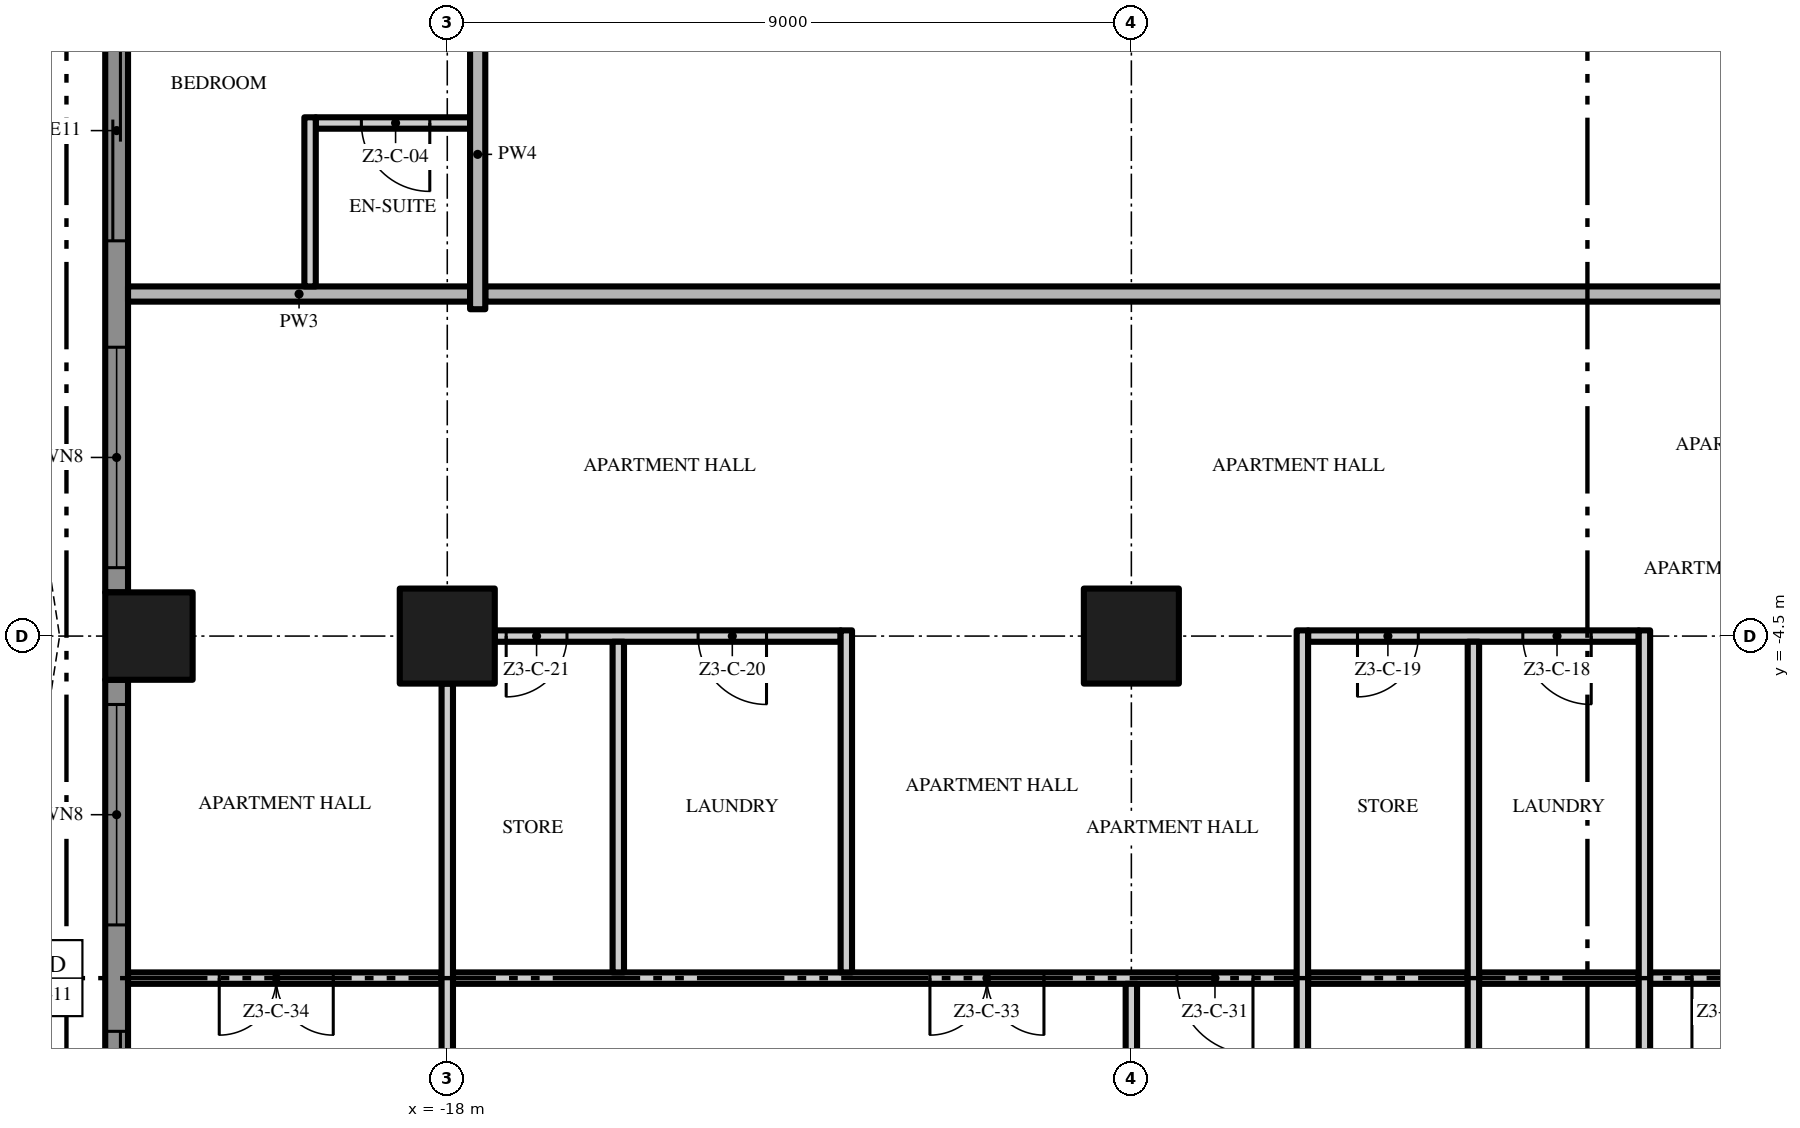
"""IFC4 building model, lengths in metres.
Left out: names, types, materials, properties, quantities, classifications, styles, units other than length and angle.
Written with IfcOpenShell. Run it as: python <this file> out.ifc"""

import sys

from ifc_helpers import new_model, si_unit, direction, frame, frame_2d, origin, origin_2d, place, context, subcontext, project, spatial, polyline, rectangle, outline, extrude, element, fill, save


model = new_model("IFC4")
c1 = context("Model", 3, precision=1e-05, world=origin(), true_north=direction((0.0, 1.0)))
c2 = subcontext(c1, "Body", "Model", "MODEL_VIEW")
j1 = project(units=[si_unit("LENGTHUNIT", "METRE"), si_unit("PLANEANGLEUNIT", "RADIAN")], contexts=[c1])
p1 = place(None, origin())
s1 = spatial("IfcSite", under=j1, at=p1, CompositionType="ELEMENT")
p2 = place(p1, origin())
s2 = spatial("IfcBuilding", under=s1, at=p2, CompositionType="ELEMENT")
p3 = place(p2, frame((0.0, 0.0, 151.6)))
s3 = spatial("IfcBuildingStorey", under=s2, at=p3, CompositionType="ELEMENT", Elevation=151.6)
p4 = place(p3, frame((-18.0, -4.5, 0.0), z_axis=(0.0, 0.0, 1.0), x_axis=(1.0, 0.0, 0.0)))
e1 = element("IfcColumn", 1, at=p4, inside=s3, PredefinedType="COLUMN", context=c2, shape_type="SweptSolid", body=[
    extrude(rectangle(XDim=1.25, YDim=1.25, at=origin_2d()), origin(), (0.0, 0.0, 1.0), 3.5),
])
p5 = place(p3, frame((-21.925, -4.5, 0.0), z_axis=(0.0, 0.0, 1.0), x_axis=(1.0, 0.0, 0.0)))
e2 = element("IfcColumn", 2, at=p5, inside=s3, PredefinedType="COLUMN", context=c2, shape_type="SweptSolid", body=[
    extrude(rectangle(XDim=1.15, YDim=1.15, at=origin_2d()), origin(), (0.0, 0.0, 1.0), 3.5),
])
p6 = place(p3, frame((-9.0, -4.5, 0.0), z_axis=(0.0, 0.0, 1.0), x_axis=(1.0, 0.0, 0.0)))
e3 = element("IfcColumn", 3, at=p6, inside=s3, PredefinedType="COLUMN", context=c2, shape_type="SweptSolid", body=[
    extrude(rectangle(XDim=1.25, YDim=1.25, at=origin_2d()), origin(), (0.0, 0.0, 1.0), 3.5),
])
p7 = place(p3, frame((-22.35, -3.925, 0.0), z_axis=(0.0, 0.0, 1.0), x_axis=(0.0, 1.0, 0.0)))
e4 = element("IfcWall", 4, at=p7, inside=s3, PredefinedType="SOLIDWALL", context=c2, shape_type="SweptSolid", body=[
    extrude(rectangle(XDim=7.85, YDim=0.3, at=frame_2d((3.925, 0.0))), origin(), (0.0, 0.0, 1.0), 3.5),
])
p8 = place(p7, frame((4.625, 0.0, 0.0)))
e5 = element("IfcOpeningElement", 5, at=p8, cuts=e4, PredefinedType="OPENING", context=c2, shape_type="SweptSolid", body=[
    extrude(rectangle(XDim=2.9, YDim=2.4, at=frame_2d((1.45, 1.2))), frame((0.0, 0.16, 0.0), z_axis=(0.0, -1.0, 0.0), x_axis=(1.0, 0.0, 0.0)), (0.0, 0.0, 1.0), 0.32),
])
p9 = place(p7, frame((0.325, 0.0, 0.45)))
e6 = element("IfcOpeningElement", 6, at=p9, cuts=e4, PredefinedType="OPENING", context=c2, shape_type="SweptSolid", body=[
    extrude(rectangle(XDim=2.9, YDim=2.65, at=frame_2d((1.45, 1.325))), frame((0.0, 0.16, 0.0), z_axis=(0.0, -1.0, 0.0), x_axis=(1.0, 0.0, 0.0)), (0.0, 0.0, 1.0), 0.32),
])
p10 = place(p3, frame((-22.35, -12.35, 0.0), z_axis=(0.0, 0.0, 1.0), x_axis=(0.0, 1.0, 0.0)))
e7 = element("IfcWall", 7, at=p10, inside=s3, PredefinedType="SOLIDWALL", context=c2, shape_type="SweptSolid", body=[
    extrude(rectangle(XDim=7.275, YDim=0.3, at=frame_2d((3.638, 0.0))), origin(), (0.0, 0.0, 1.0), 3.5),
])
p11 = place(p10, frame((4.05, 0.0, 0.45)))
e8 = element("IfcOpeningElement", 8, at=p11, cuts=e7, PredefinedType="OPENING", context=c2, shape_type="SweptSolid", body=[
    extrude(rectangle(XDim=2.9, YDim=2.65, at=frame_2d((1.45, 1.325))), frame((0.0, 0.16, 0.0), z_axis=(0.0, -1.0, 0.0), x_axis=(1.0, 0.0, 0.0)), (0.0, 0.0, 1.0), 0.32),
])
p12 = place(p10, frame((0.3, 0.0, 0.0)))
e9 = element("IfcOpeningElement", 9, at=p12, cuts=e7, PredefinedType="OPENING", context=c2, shape_type="SweptSolid", body=[
    extrude(rectangle(XDim=2.35, YDim=2.4, at=frame_2d((1.175, 1.2))), frame((0.0, 0.16, 0.0), z_axis=(0.0, -1.0, 0.0), x_axis=(1.0, 0.0, 0.0)), (0.0, 0.0, 1.0), 0.32),
])
p13 = place(p3, origin())
e10 = element("IfcWall", 10, at=p13, inside=s3, PredefinedType="USERDEFINED", context=c2, shape_type="SweptSolid", body=[
    extrude(outline(polyline([(-25.5, 18.0), (-25.271, 16.5), (-24.671, 15.0), (-23.929, 13.5), (-23.329, 12.0), (-23.1, 10.5), (-23.329, 9.0), (-23.929, 7.5), (-24.671, 6.0), (-25.271, 4.5), (-25.5, 3.0), (-25.271, 1.5), (-24.671, 0.0), (-23.929, -1.5), (-23.329, -3.0), (-23.1, -4.5), (-23.329, -6.0), (-23.929, -7.5), (-24.671, -9.0), (-25.271, -10.5), (-25.5, -12.0), (-25.271, -13.5), (-25.024, -13.462), (-25.247, -12.0), (-25.028, -10.566), (-24.442, -9.102), (-23.701, -7.602), (-23.086, -6.066), (-22.847, -4.5), (-23.086, -2.934), (-23.701, -1.398), (-24.442, 0.102), (-25.028, 1.566), (-25.247, 3.0), (-25.028, 4.434), (-24.442, 5.898), (-23.701, 7.398), (-23.086, 8.934), (-22.847, 10.5), (-23.086, 12.066), (-23.701, 13.602), (-24.442, 15.102), (-25.028, 16.566), (-25.253, 18.038), (-25.5, 18.0)])), origin(), (0.0, 0.0, 1.0), 0.9),
])
p14 = place(p3, frame((-18.075, -9.0, 0.0), z_axis=(0.0, 0.0, 1.0), x_axis=(-1.0, 0.0, 0.0)))
e11 = element("IfcWall", 11, at=p14, inside=s3, PredefinedType="PARTITIONING", context=c2, shape_type="SweptSolid", body=[
    extrude(rectangle(XDim=4.125, YDim=0.15, at=frame_2d((2.062, 0.0))), origin(), (0.0, 0.0, 1.0), 3.5),
])
p15 = place(p14, frame((1.425, 0.0, 0.0)))
e12 = element("IfcOpeningElement", 12, at=p15, cuts=e11, PredefinedType="OPENING", context=c2, shape_type="SweptSolid", body=[
    extrude(rectangle(XDim=1.5, YDim=2.4, at=frame_2d((0.75, 1.2))), frame((0.0, 0.085, 0.0), z_axis=(0.0, -1.0, 0.0), x_axis=(1.0, 0.0, 0.0)), (0.0, 0.0, 1.0), 0.17),
])
p16 = place(p3, frame((-6.825, -9.0, 0.0), z_axis=(0.0, 0.0, 1.0), x_axis=(-1.0, 0.0, 0.0)))
e13 = element("IfcWall", 13, at=p16, inside=s3, PredefinedType="PARTITIONING", context=c2, shape_type="SweptSolid", body=[
    extrude(rectangle(XDim=11.1, YDim=0.15, at=frame_2d((5.55, 0.0))), origin(), (0.0, 0.0, 1.0), 3.5),
])
p17 = place(p16, frame((0.575, 0.0, 0.0)))
e14 = element("IfcOpeningElement", 14, at=p17, cuts=e13, PredefinedType="OPENING", context=c2, shape_type="SweptSolid", body=[
    extrude(rectangle(XDim=1.0, YDim=2.4, at=frame_2d((0.5, 1.2))), frame((0.0, 0.085, 0.0), z_axis=(0.0, -1.0, 0.0), x_axis=(1.0, 0.0, 0.0)), (0.0, 0.0, 1.0), 0.17),
])
p18 = place(p16, frame((3.325, 0.0, 0.0)))
e15 = element("IfcOpeningElement", 15, at=p18, cuts=e13, PredefinedType="OPENING", context=c2, shape_type="SweptSolid", body=[
    extrude(rectangle(XDim=1.5, YDim=2.4, at=frame_2d((0.75, 1.2))), frame((0.0, 0.085, 0.0), z_axis=(0.0, -1.0, 0.0), x_axis=(1.0, 0.0, 0.0)), (0.0, 0.0, 1.0), 0.17),
])
for number, where, z_axis, x_axis in (
    (16, (-6.675, -9.0, 0.0), (0.0, 0.0, 1.0), (1.0, 0.0, 0.0)),
    (17, (-4.425, -9.0, 0.0), (0.0, 0.0, 1.0), (1.0, 0.0, 0.0)),
):
    element("IfcWall", number, at=place(p3, frame(where, z_axis=z_axis, x_axis=x_axis)), inside=s3, PredefinedType="PARTITIONING", context=c2, shape_type="SweptSolid", body=[
        extrude(rectangle(XDim=2.1, YDim=0.15, at=frame_2d((1.05, 0.0))), origin(), (0.0, 0.0, 1.0), 3.5),
    ])
p19 = place(p3, frame((-0.075, -9.0, 0.0), z_axis=(0.0, 0.0, 1.0), x_axis=(-1.0, 0.0, 0.0)))
e18 = element("IfcWall", 18, at=p19, inside=s3, PredefinedType="PARTITIONING", context=c2, shape_type="SweptSolid", body=[
    extrude(rectangle(XDim=2.1, YDim=0.15, at=frame_2d((1.05, 0.0))), origin(), (0.0, 0.0, 1.0), 3.5),
])
p20 = place(p19, frame((0.55, 0.0, 0.0)))
e19 = element("IfcOpeningElement", 19, at=p20, cuts=e18, PredefinedType="OPENING", context=c2, shape_type="SweptSolid", body=[
    extrude(rectangle(XDim=1.0, YDim=2.4, at=frame_2d((0.5, 1.2))), frame((0.0, 0.085, 0.0), z_axis=(0.0, -1.0, 0.0), x_axis=(1.0, 0.0, 0.0)), (0.0, 0.0, 1.0), 0.17),
])
p21 = place(p3, frame((-12.825, -4.5, 0.0), z_axis=(0.0, 0.0, 1.0), x_axis=(-1.0, 0.0, 0.0)))
e20 = element("IfcWall", 20, at=p21, inside=s3, PredefinedType="PARTITIONING", context=c2, shape_type="SweptSolid", body=[
    extrude(rectangle(XDim=4.55, YDim=0.15, at=frame_2d((2.275, 0.0))), origin(), (0.0, 0.0, 1.0), 3.5),
])
p22 = place(p21, frame((0.975, 0.0, 0.0)))
e21 = element("IfcOpeningElement", 21, at=p22, cuts=e20, PredefinedType="OPENING", context=c2, shape_type="SweptSolid", body=[
    extrude(rectangle(XDim=0.9, YDim=2.1, at=frame_2d((0.45, 1.05))), frame((0.0, 0.085, 0.0), z_axis=(0.0, -1.0, 0.0), x_axis=(1.0, 0.0, 0.0)), (0.0, 0.0, 1.0), 0.17),
])
p23 = place(p21, frame((3.6, 0.0, 0.0)))
e22 = element("IfcOpeningElement", 22, at=p23, cuts=e20, PredefinedType="OPENING", context=c2, shape_type="SweptSolid", body=[
    extrude(rectangle(XDim=0.8, YDim=2.0, at=frame_2d((0.4, 1.0))), frame((0.0, 0.085, 0.0), z_axis=(0.0, -1.0, 0.0), x_axis=(1.0, 0.0, 0.0)), (0.0, 0.0, 1.0), 0.17),
])
p24 = place(p3, frame((-2.325, -4.5, 0.0), z_axis=(0.0, 0.0, 1.0), x_axis=(-1.0, 0.0, 0.0)))
e23 = element("IfcWall", 23, at=p24, inside=s3, PredefinedType="PARTITIONING", context=c2, shape_type="SweptSolid", body=[
    extrude(rectangle(XDim=4.35, YDim=0.15, at=frame_2d((2.175, 0.0))), origin(), (0.0, 0.0, 1.0), 3.5),
])
p25 = place(p24, frame((0.625, 0.0, 0.0)))
e24 = element("IfcOpeningElement", 24, at=p25, cuts=e23, PredefinedType="OPENING", context=c2, shape_type="SweptSolid", body=[
    extrude(rectangle(XDim=0.9, YDim=2.1, at=frame_2d((0.45, 1.05))), frame((0.0, 0.085, 0.0), z_axis=(0.0, -1.0, 0.0), x_axis=(1.0, 0.0, 0.0)), (0.0, 0.0, 1.0), 0.17),
])
p26 = place(p24, frame((2.9, 0.0, 0.0)))
e25 = element("IfcOpeningElement", 25, at=p26, cuts=e23, PredefinedType="OPENING", context=c2, shape_type="SweptSolid", body=[
    extrude(rectangle(XDim=0.8, YDim=2.0, at=frame_2d((0.4, 1.0))), frame((0.0, 0.085, 0.0), z_axis=(0.0, -1.0, 0.0), x_axis=(1.0, 0.0, 0.0)), (0.0, 0.0, 1.0), 0.17),
])
p27 = place(p3, frame((17.5, 0.0, 0.0), z_axis=(0.0, 0.0, 1.0), x_axis=(-1.0, 0.0, 0.0)))
e26 = element("IfcWall", 26, at=p27, inside=s3, PredefinedType="PARTITIONING", context=c2, shape_type="SweptSolid", body=[
    extrude(rectangle(XDim=35.0, YDim=0.2, at=frame_2d((17.5, 0.0))), origin(), (0.0, 0.0, 1.0), 3.5),
])
p28 = place(p27, frame((16.75, 0.0, 0.0)))
e27 = element("IfcOpeningElement", 27, at=p28, cuts=e26, PredefinedType="OPENING", context=c2, shape_type="SweptSolid", body=[
    extrude(rectangle(XDim=1.5, YDim=2.4, at=frame_2d((0.75, 1.2))), frame((0.0, 0.11, 0.0), z_axis=(0.0, -1.0, 0.0), x_axis=(1.0, 0.0, 0.0)), (0.0, 0.0, 1.0), 0.22),
])
p29 = place(p3, frame((-22.2, 0.0, 0.0), z_axis=(0.0, 0.0, 1.0), x_axis=(1.0, 0.0, 0.0)))
e28 = element("IfcWall", 28, at=p29, inside=s3, PredefinedType="PARTITIONING", context=c2, shape_type="SweptSolid", body=[
    extrude(rectangle(XDim=4.5, YDim=0.2, at=frame_2d((2.25, 0.0))), origin(), (0.0, 0.0, 1.0), 3.5),
])
p30 = place(p3, frame((-17.7, 2.25, 0.0), z_axis=(0.0, 0.0, 1.0), x_axis=(-1.0, 0.0, 0.0)))
e29 = element("IfcWall", 29, at=p30, inside=s3, PredefinedType="PARTITIONING", context=c2, shape_type="SweptSolid", body=[
    extrude(rectangle(XDim=2.03, YDim=0.15, at=frame_2d((1.015, 0.0))), origin(), (0.0, 0.0, 1.0), 3.5),
])
p31 = place(p30, frame((0.53, 0.0, 0.0)))
e30 = element("IfcOpeningElement", 30, at=p31, cuts=e29, PredefinedType="OPENING", context=c2, shape_type="SweptSolid", body=[
    extrude(rectangle(XDim=0.9, YDim=2.1, at=frame_2d((0.45, 1.05))), frame((0.0, 0.085, 0.0), z_axis=(0.0, -1.0, 0.0), x_axis=(1.0, 0.0, 0.0)), (0.0, 0.0, 1.0), 0.17),
])
p32 = place(p3, frame((-19.805, 0.1, 0.0), z_axis=(0.0, 0.0, 1.0), x_axis=(0.0, 1.0, 0.0)))
e31 = element("IfcWall", 31, at=p32, inside=s3, PredefinedType="PARTITIONING", context=c2, shape_type="SweptSolid", body=[
    extrude(rectangle(XDim=2.225, YDim=0.15, at=frame_2d((1.113, 0.0))), origin(), (0.0, 0.0, 1.0), 3.5),
])
p33 = place(p3, frame((-18.0, -12.875, 0.0), z_axis=(0.0, 0.0, 1.0), x_axis=(0.0, 1.0, 0.0)))
e32 = element("IfcWall", 32, at=p33, inside=s3, PredefinedType="PARTITIONING", context=c2, shape_type="SweptSolid", body=[
    extrude(rectangle(XDim=7.75, YDim=0.15, at=frame_2d((3.875, 0.0))), origin(), (0.0, 0.0, 1.0), 3.5),
])
p34 = place(p3, frame((-17.6, -0.2, 0.0), z_axis=(0.0, 0.0, 1.0), x_axis=(0.0, 1.0, 0.0)))
e33 = element("IfcWall", 33, at=p34, inside=s3, PredefinedType="PARTITIONING", context=c2, shape_type="SweptSolid", body=[
    extrude(rectangle(XDim=4.075, YDim=0.2, at=frame_2d((2.038, 0.0))), origin(), (0.0, 0.0, 1.0), 3.5),
])
p35 = place(p3, frame((-15.75, -8.925, 0.0), z_axis=(0.0, 0.0, 1.0), x_axis=(0.0, 1.0, 0.0)))
e34 = element("IfcWall", 34, at=p35, inside=s3, PredefinedType="PARTITIONING", context=c2, shape_type="SweptSolid", body=[
    extrude(rectangle(XDim=4.35, YDim=0.15, at=frame_2d((2.175, 0.0))), origin(), (0.0, 0.0, 1.0), 3.5),
])
p36 = place(p3, frame((-12.75, -8.925, 0.0), z_axis=(0.0, 0.0, 1.0), x_axis=(0.0, 1.0, 0.0)))
e35 = element("IfcWall", 35, at=p36, inside=s3, PredefinedType="PARTITIONING", context=c2, shape_type="SweptSolid", body=[
    extrude(rectangle(XDim=4.5, YDim=0.15, at=frame_2d((2.25, 0.0))), origin(), (0.0, 0.0, 1.0), 3.5),
])
p37 = place(p3, frame((-9.0, -12.875, 0.0), z_axis=(0.0, 0.0, 1.0), x_axis=(0.0, 1.0, 0.0)))
e36 = element("IfcWall", 36, at=p37, inside=s3, PredefinedType="PARTITIONING", context=c2, shape_type="SweptSolid", body=[
    extrude(rectangle(XDim=3.8, YDim=0.15, at=frame_2d((1.9, 0.0))), origin(), (0.0, 0.0, 1.0), 3.5),
])
p38 = place(p3, frame((-6.75, -12.075, 0.0), z_axis=(0.0, 0.0, 1.0), x_axis=(0.0, 1.0, 0.0)))
e37 = element("IfcWall", 37, at=p38, inside=s3, PredefinedType="PARTITIONING", context=c2, shape_type="SweptSolid", body=[
    extrude(rectangle(XDim=7.65, YDim=0.15, at=frame_2d((3.825, 0.0))), origin(), (0.0, 0.0, 1.0), 3.5),
])
p39 = place(p3, frame((-4.5, -17.7, 0.0), z_axis=(0.0, 0.0, 1.0), x_axis=(0.0, 1.0, 0.0)))
e38 = element("IfcWall", 38, at=p39, inside=s3, PredefinedType="PARTITIONING", context=c2, shape_type="SweptSolid", body=[
    extrude(rectangle(XDim=13.125, YDim=0.15, at=frame_2d((6.562, 0.0))), origin(), (0.0, 0.0, 1.0), 3.5),
])
p40 = place(p3, frame((-2.25, -12.075, 0.0), z_axis=(0.0, 0.0, 1.0), x_axis=(0.0, 1.0, 0.0)))
e39 = element("IfcWall", 39, at=p40, inside=s3, PredefinedType="PARTITIONING", context=c2, shape_type="SweptSolid", body=[
    extrude(rectangle(XDim=7.65, YDim=0.15, at=frame_2d((3.825, 0.0))), origin(), (0.0, 0.0, 1.0), 3.5),
])
p41 = place(p8, origin())
e40 = element("IfcDoor", 40, at=p41, inside=s3, OperationType="SINGLE_SWING_LEFT", PredefinedType="DOOR", context=c2, shape_type="SweptSolid", body=[
    extrude(rectangle(XDim=2.9, YDim=2.4, at=frame_2d((1.45, 1.2))), frame((0.0, 0.025, 0.0), z_axis=(0.0, -1.0, 0.0), x_axis=(1.0, 0.0, 0.0)), (0.0, 0.0, 1.0), 0.05),
])
fill(e5, e40)
p42 = place(p9, origin())
e41 = element("IfcWindow", 41, at=p42, inside=s3, PartitioningType="SINGLE_PANEL", PredefinedType="WINDOW", context=c2, shape_type="SweptSolid", body=[
    extrude(rectangle(XDim=2.9, YDim=2.65, at=frame_2d((1.45, 1.325))), frame((0.0, 0.03, 0.0), z_axis=(0.0, -1.0, 0.0), x_axis=(1.0, 0.0, 0.0)), (0.0, 0.0, 1.0), 0.06),
])
fill(e6, e41)
p43 = place(p11, origin())
e42 = element("IfcWindow", 42, at=p43, inside=s3, PartitioningType="SINGLE_PANEL", PredefinedType="WINDOW", context=c2, shape_type="SweptSolid", body=[
    extrude(rectangle(XDim=2.9, YDim=2.65, at=frame_2d((1.45, 1.325))), frame((0.0, 0.03, 0.0), z_axis=(0.0, -1.0, 0.0), x_axis=(1.0, 0.0, 0.0)), (0.0, 0.0, 1.0), 0.06),
])
fill(e8, e42)
p44 = place(p12, origin())
e43 = element("IfcDoor", 43, at=p44, inside=s3, OperationType="SINGLE_SWING_LEFT", PredefinedType="DOOR", context=c2, shape_type="SweptSolid", body=[
    extrude(rectangle(XDim=2.35, YDim=2.4, at=frame_2d((1.175, 1.2))), frame((0.0, 0.025, 0.0), z_axis=(0.0, -1.0, 0.0), x_axis=(1.0, 0.0, 0.0)), (0.0, 0.0, 1.0), 0.05),
])
fill(e9, e43)
p45 = place(p31, origin())
e44 = element("IfcDoor", 44, at=p45, inside=s3, OperationType="SINGLE_SWING_LEFT", PredefinedType="DOOR", context=c2, shape_type="SweptSolid", body=[
    extrude(rectangle(XDim=0.9, YDim=2.1, at=frame_2d((0.45, 1.05))), frame((0.0, 0.025, 0.0), z_axis=(0.0, -1.0, 0.0), x_axis=(1.0, 0.0, 0.0)), (0.0, 0.0, 1.0), 0.05),
])
fill(e30, e44)
p46 = place(p25, origin())
e45 = element("IfcDoor", 45, at=p46, inside=s3, OperationType="SINGLE_SWING_LEFT", PredefinedType="DOOR", context=c2, shape_type="SweptSolid", body=[
    extrude(rectangle(XDim=0.9, YDim=2.1, at=frame_2d((0.45, 1.05))), frame((0.0, 0.025, 0.0), z_axis=(0.0, -1.0, 0.0), x_axis=(1.0, 0.0, 0.0)), (0.0, 0.0, 1.0), 0.05),
])
fill(e24, e45)
p47 = place(p26, origin())
e46 = element("IfcDoor", 46, at=p47, inside=s3, OperationType="SINGLE_SWING_RIGHT", PredefinedType="DOOR", context=c2, shape_type="SweptSolid", body=[
    extrude(rectangle(XDim=0.8, YDim=2.0, at=frame_2d((0.4, 1.0))), frame((0.0, 0.025, 0.0), z_axis=(0.0, -1.0, 0.0), x_axis=(1.0, 0.0, 0.0)), (0.0, 0.0, 1.0), 0.05),
])
fill(e25, e46)
p48 = place(p22, origin())
e47 = element("IfcDoor", 47, at=p48, inside=s3, OperationType="SINGLE_SWING_LEFT", PredefinedType="DOOR", context=c2, shape_type="SweptSolid", body=[
    extrude(rectangle(XDim=0.9, YDim=2.1, at=frame_2d((0.45, 1.05))), frame((0.0, 0.025, 0.0), z_axis=(0.0, -1.0, 0.0), x_axis=(1.0, 0.0, 0.0)), (0.0, 0.0, 1.0), 0.05),
])
fill(e21, e47)
p49 = place(p23, origin())
e48 = element("IfcDoor", 48, at=p49, inside=s3, OperationType="SINGLE_SWING_RIGHT", PredefinedType="DOOR", context=c2, shape_type="SweptSolid", body=[
    extrude(rectangle(XDim=0.8, YDim=2.0, at=frame_2d((0.4, 1.0))), frame((0.0, 0.025, 0.0), z_axis=(0.0, -1.0, 0.0), x_axis=(1.0, 0.0, 0.0)), (0.0, 0.0, 1.0), 0.05),
])
fill(e22, e48)
p50 = place(p20, origin())
e49 = element("IfcDoor", 49, at=p50, inside=s3, OperationType="SINGLE_SWING_RIGHT", PredefinedType="DOOR", context=c2, shape_type="SweptSolid", body=[
    extrude(rectangle(XDim=1.0, YDim=2.4, at=frame_2d((0.5, 1.2))), frame((0.0, 0.025, 0.0), z_axis=(0.0, -1.0, 0.0), x_axis=(1.0, 0.0, 0.0)), (0.0, 0.0, 1.0), 0.05),
])
fill(e19, e49)
p51 = place(p17, origin())
e50 = element("IfcDoor", 50, at=p51, inside=s3, OperationType="SINGLE_SWING_LEFT", PredefinedType="DOOR", context=c2, shape_type="SweptSolid", body=[
    extrude(rectangle(XDim=1.0, YDim=2.4, at=frame_2d((0.5, 1.2))), frame((0.0, 0.025, 0.0), z_axis=(0.0, -1.0, 0.0), x_axis=(1.0, 0.0, 0.0)), (0.0, 0.0, 1.0), 0.05),
])
fill(e14, e50)
p52 = place(p18, origin())
e51 = element("IfcDoor", 51, at=p52, inside=s3, OperationType="DOUBLE_DOOR_SINGLE_SWING", PredefinedType="DOOR", context=c2, shape_type="SweptSolid", body=[
    extrude(rectangle(XDim=1.5, YDim=2.4, at=frame_2d((0.75, 1.2))), frame((0.0, 0.025, 0.0), z_axis=(0.0, -1.0, 0.0), x_axis=(1.0, 0.0, 0.0)), (0.0, 0.0, 1.0), 0.05),
])
fill(e15, e51)
p53 = place(p15, origin())
e52 = element("IfcDoor", 52, at=p53, inside=s3, OperationType="DOUBLE_DOOR_SINGLE_SWING", PredefinedType="DOOR", context=c2, shape_type="SweptSolid", body=[
    extrude(rectangle(XDim=1.5, YDim=2.4, at=frame_2d((0.75, 1.2))), frame((0.0, 0.025, 0.0), z_axis=(0.0, -1.0, 0.0), x_axis=(1.0, 0.0, 0.0)), (0.0, 0.0, 1.0), 0.05),
])
fill(e12, e52)
save(model, sys.argv[1])
